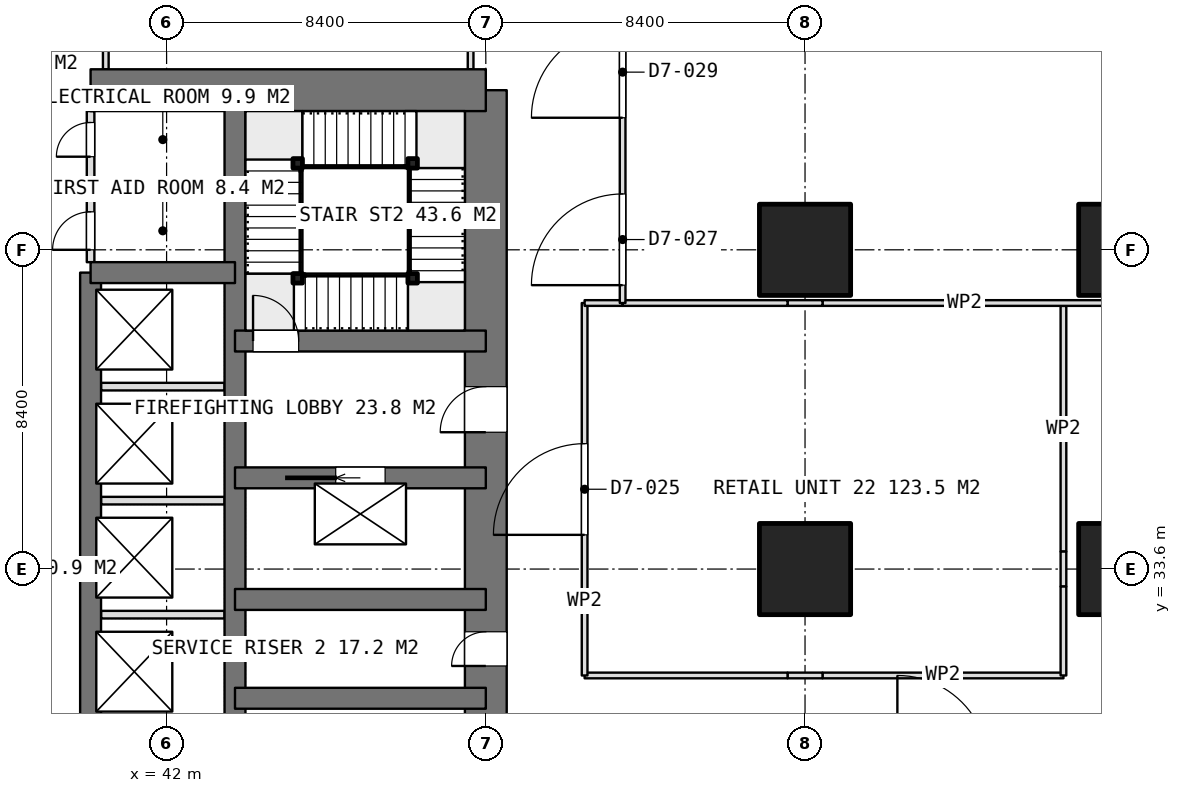
"""IFC4 building model, lengths in metres.
Left out: names, types, materials, properties, quantities, classifications, styles, units other than length and angle.
Written with IfcOpenShell. Run it as: python <this file> out.ifc"""

import sys

from ifc_helpers import new_model, si_unit, direction, frame, frame_2d, origin, origin_2d, place, context, subcontext, project, spatial, rectangle, extrude, element, fill, save


model = new_model("IFC4")
c1 = context("Model", 3, precision=1e-05, world=origin(), true_north=direction((0.0, 1.0)))
c2 = subcontext(c1, "Body", "Model", "MODEL_VIEW")
j1 = project(units=[si_unit("LENGTHUNIT", "METRE"), si_unit("PLANEANGLEUNIT", "RADIAN")], contexts=[c1])
p1 = place(None, origin())
s1 = spatial("IfcSite", under=j1, at=p1, CompositionType="ELEMENT")
p2 = place(p1, origin())
s2 = spatial("IfcBuilding", under=s1, at=p2, CompositionType="ELEMENT")
p3 = place(p2, frame((0.0, 0.0, 10.4)))
s3 = spatial("IfcBuildingStorey", under=s2, at=p3, CompositionType="ELEMENT", Elevation=10.4)
p4 = place(p3, frame((40.0, 46.2, 0.0), z_axis=(0.0, 0.0, 1.0), x_axis=(1.0, 0.0, 0.0)))
e1 = element("IfcWall", 1, at=p4, inside=s3, PredefinedType="SHEAR", context=c2, shape_type="SweptSolid", body=[
    extrude(rectangle(XDim=10.4, YDim=1.1, at=frame_2d((5.2, 0.0))), origin(), (0.0, 0.0, 1.0), 5.0),
])
p5 = place(p3, frame((50.4, 21.0, 0.0), z_axis=(0.0, 0.0, 1.0), x_axis=(0.0, 1.0, 0.0)))
e2 = element("IfcWall", 2, at=p5, inside=s3, PredefinedType="SHEAR", context=c2, shape_type="SweptSolid", body=[
    extrude(rectangle(XDim=25.2, YDim=1.1, at=frame_2d((12.6, 0.0))), origin(), (0.0, 0.0, 1.0), 5.0),
])
p6 = place(p5, frame((16.2, 0.0, 0.0)))
e3 = element("IfcOpeningElement", 3, at=p6, cuts=e2, PredefinedType="OPENING", context=c2, shape_type="SweptSolid", body=[
    extrude(rectangle(XDim=1.2, YDim=2.1, at=frame_2d((0.6, 1.05))), frame((0.0, 0.56, 0.0), z_axis=(0.0, -1.0, 0.0), x_axis=(1.0, 0.0, 0.0)), (0.0, 0.0, 1.0), 1.12),
])
p7 = place(p5, frame((10.05, 0.0, 0.0)))
e4 = element("IfcOpeningElement", 4, at=p7, cuts=e2, PredefinedType="OPENING", context=c2, shape_type="SweptSolid", body=[
    extrude(rectangle(XDim=0.9, YDim=2.1, at=frame_2d((0.45, 1.05))), frame((0.0, 0.56, 0.0), z_axis=(0.0, -1.0, 0.0), x_axis=(1.0, 0.0, 0.0)), (0.0, 0.0, 1.0), 1.12),
])
p8 = place(p5, frame((7.45, 0.0, 0.0)))
e5 = element("IfcOpeningElement", 5, at=p8, cuts=e2, PredefinedType="OPENING", context=c2, shape_type="SweptSolid", body=[
    extrude(rectangle(XDim=0.9, YDim=2.1, at=frame_2d((0.45, 1.05))), frame((0.0, 0.56, 0.0), z_axis=(0.0, -1.0, 0.0), x_axis=(1.0, 0.0, 0.0)), (0.0, 0.0, 1.0), 1.12),
])
p9 = place(p5, frame((0.75, 0.0, 0.0)))
e6 = element("IfcOpeningElement", 6, at=p9, cuts=e2, PredefinedType="OPENING", context=c2, shape_type="SweptSolid", body=[
    extrude(rectangle(XDim=1.2, YDim=2.1, at=frame_2d((0.6, 1.05))), frame((0.0, 0.56, 0.0), z_axis=(0.0, -1.0, 0.0), x_axis=(1.0, 0.0, 0.0)), (0.0, 0.0, 1.0), 1.12),
])
p10 = place(p3, frame((43.8, 21.0, 0.0), z_axis=(0.0, 0.0, 1.0), x_axis=(0.0, 1.0, 0.0)))
e7 = element("IfcWall", 7, at=p10, inside=s3, PredefinedType="SHEAR", context=c2, shape_type="SweptSolid", body=[
    extrude(rectangle(XDim=25.2, YDim=0.55, at=frame_2d((12.6, 0.0))), origin(), (0.0, 0.0, 1.0), 5.0),
])
p11 = place(p3, frame((40.0, 23.4, 0.0), z_axis=(0.0, 0.0, 1.0), x_axis=(0.0, 1.0, 0.0)))
e8 = element("IfcWall", 8, at=p11, inside=s3, PredefinedType="SHEAR", context=c2, shape_type="SweptSolid", body=[
    extrude(rectangle(XDim=18.0, YDim=0.55, at=frame_2d((9.0, 0.0))), origin(), (0.0, 0.0, 1.0), 5.0),
])
p12 = place(p3, frame((40.0, 41.4, 0.0), z_axis=(0.0, 0.0, 1.0), x_axis=(1.0, 0.0, 0.0)))
e9 = element("IfcWall", 9, at=p12, inside=s3, PredefinedType="SHEAR", context=c2, shape_type="SweptSolid", body=[
    extrude(rectangle(XDim=3.8, YDim=0.55, at=frame_2d((1.9, 0.0))), origin(), (0.0, 0.0, 1.0), 5.0),
])
for number, where, z_axis, x_axis in (
    (10, (43.8, 30.2, 0.0), (0.0, 0.0, 1.0), (1.0, 0.0, 0.0)),
    (11, (43.8, 32.8, 0.0), (0.0, 0.0, 1.0), (1.0, 0.0, 0.0)),
):
    element("IfcWall", number, at=place(p3, frame(where, z_axis=z_axis, x_axis=x_axis)), inside=s3, PredefinedType="SHEAR", context=c2, shape_type="SweptSolid", body=[
        extrude(rectangle(XDim=6.6, YDim=0.55, at=frame_2d((3.3, 0.0))), origin(), (0.0, 0.0, 1.0), 5.0),
    ])
p13 = place(p3, frame((43.8, 36.0, 0.0), z_axis=(0.0, 0.0, 1.0), x_axis=(1.0, 0.0, 0.0)))
e12 = element("IfcWall", 12, at=p13, inside=s3, PredefinedType="SHEAR", context=c2, shape_type="SweptSolid", body=[
    extrude(rectangle(XDim=6.6, YDim=0.55, at=frame_2d((3.3, 0.0))), origin(), (0.0, 0.0, 1.0), 5.0),
])
p14 = place(p13, frame((2.65, 0.0, 0.0)))
e13 = element("IfcOpeningElement", 13, at=p14, cuts=e12, PredefinedType="OPENING", context=c2, shape_type="SweptSolid", body=[
    extrude(rectangle(XDim=1.3, YDim=2.1, at=frame_2d((0.65, 1.05))), frame((0.0, 0.285, 0.0), z_axis=(0.0, -1.0, 0.0), x_axis=(1.0, 0.0, 0.0)), (0.0, 0.0, 1.0), 0.57),
])
p15 = place(p3, frame((43.8, 39.6, 0.0), z_axis=(0.0, 0.0, 1.0), x_axis=(1.0, 0.0, 0.0)))
e14 = element("IfcWall", 14, at=p15, inside=s3, PredefinedType="SHEAR", context=c2, shape_type="SweptSolid", body=[
    extrude(rectangle(XDim=6.6, YDim=0.55, at=frame_2d((3.3, 0.0))), origin(), (0.0, 0.0, 1.0), 5.0),
])
p16 = place(p15, frame((0.475, 0.0, 0.0)))
e15 = element("IfcOpeningElement", 15, at=p16, cuts=e14, PredefinedType="OPENING", context=c2, shape_type="SweptSolid", body=[
    extrude(rectangle(XDim=1.2, YDim=2.1, at=frame_2d((0.6, 1.05))), frame((0.0, 0.285, 0.0), z_axis=(0.0, -1.0, 0.0), x_axis=(1.0, 0.0, 0.0)), (0.0, 0.0, 1.0), 0.57),
])
for number, where, z_axis, x_axis in (
    (16, (58.8, 33.6, 0.0), (0.0, 0.0, 1.0), (1.0, 0.0, 0.0)),
    (17, (58.8, 42.0, 0.0), (0.0, 0.0, 1.0), (1.0, 0.0, 0.0)),
    (18, (67.2, 33.6, 0.0), (0.0, 0.0, 1.0), (1.0, 0.0, 0.0)),
    (19, (67.2, 42.0, 0.0), (0.0, 0.0, 1.0), (1.0, 0.0, 0.0)),
):
    element("IfcColumn", number, at=place(p3, frame(where, z_axis=z_axis, x_axis=x_axis)), inside=s3, PredefinedType="COLUMN", context=c2, shape_type="SweptSolid", body=[
        extrude(rectangle(XDim=2.4, YDim=2.4, at=origin_2d()), origin(), (0.0, 0.0, 1.0), 5.0),
    ])
for number, where, z_axis, x_axis in (
    (20, (40.275, 32.4, 0.0), (0.0, 0.0, 1.0), (1.0, 0.0, 0.0)),
    (21, (40.275, 35.4, 0.0), (0.0, 0.0, 1.0), (1.0, 0.0, 0.0)),
    (22, (40.275, 38.4, 0.0), (0.0, 0.0, 1.0), (1.0, 0.0, 0.0)),
):
    element("IfcWall", number, at=place(p3, frame(where, z_axis=z_axis, x_axis=x_axis)), inside=s3, PredefinedType="PARTITIONING", context=c2, shape_type="SweptSolid", body=[
        extrude(rectangle(XDim=3.25, YDim=0.2, at=frame_2d((1.625, 0.0))), origin(), (0.0, 0.0, 1.0), 4.7),
    ])
p17 = place(p3, frame((40.0, 41.675, 0.0), z_axis=(0.0, 0.0, 1.0), x_axis=(0.0, 1.0, 0.0)))
e23 = element("IfcWall", 23, at=p17, inside=s3, PredefinedType="PARTITIONING", context=c2, shape_type="SweptSolid", body=[
    extrude(rectangle(XDim=3.975, YDim=0.2, at=frame_2d((1.987, 0.0))), origin(), (0.0, 0.0, 1.0), 4.7),
])
p18 = place(p17, frame((2.775, 0.0, 0.0)))
e24 = element("IfcOpeningElement", 24, at=p18, cuts=e23, PredefinedType="OPENING", context=c2, shape_type="SweptSolid", body=[
    extrude(rectangle(XDim=0.9, YDim=2.1, at=frame_2d((0.45, 1.05))), frame((0.0, 0.11, 0.0), z_axis=(0.0, -1.0, 0.0), x_axis=(1.0, 0.0, 0.0)), (0.0, 0.0, 1.0), 0.22),
])
p19 = place(p17, frame((0.325, 0.0, 0.0)))
e25 = element("IfcOpeningElement", 25, at=p19, cuts=e23, PredefinedType="OPENING", context=c2, shape_type="SweptSolid", body=[
    extrude(rectangle(XDim=1.0, YDim=2.1, at=frame_2d((0.5, 1.05))), frame((0.0, 0.11, 0.0), z_axis=(0.0, -1.0, 0.0), x_axis=(1.0, 0.0, 0.0)), (0.0, 0.0, 1.0), 0.22),
])
p20 = place(p3, frame((40.0, 43.6, 0.0), z_axis=(0.0, 0.0, 1.0), x_axis=(1.0, 0.0, 0.0)))
e26 = element("IfcWall", 26, at=p20, inside=s3, PredefinedType="PARTITIONING", context=c2, shape_type="SweptSolid", body=[
    extrude(rectangle(XDim=3.525, YDim=0.2, at=frame_2d((1.762, 0.0))), origin(), (0.0, 0.0, 1.0), 4.7),
])
for number, where, z_axis, x_axis in (
    (27, (40.4, 46.75, 0.0), (0.0, 0.0, 1.0), (0.0, 1.0, 0.0)),
    (28, (50.0, 46.75, 0.0), (0.0, 0.0, 1.0), (0.0, 1.0, 0.0)),
):
    element("IfcWall", number, at=place(p3, frame(where, z_axis=z_axis, x_axis=x_axis)), inside=s3, PredefinedType="PARTITIONING", context=c2, shape_type="SweptSolid", body=[
        extrude(rectangle(XDim=2.575, YDim=0.15, at=frame_2d((1.288, 0.0))), origin(), (0.0, 0.0, 1.0), 4.7),
    ])
p21 = place(p3, frame((66.74, 40.6, 0.0), z_axis=(0.0, 0.0, 1.0), x_axis=(-1.0, 0.0, 0.0)))
e29 = element("IfcWall", 29, at=p21, inside=s3, PredefinedType="PARTITIONING", context=c2, shape_type="SweptSolid", body=[
    extrude(rectangle(XDim=7.48, YDim=0.15, at=frame_2d((3.74, 0.0))), origin(), (0.0, 0.0, 1.0), 4.7),
])
p22 = place(p3, frame((59.26, 40.6, 0.0), z_axis=(0.0, 0.0, 1.0), x_axis=(-1.0, 0.0, 0.0)))
e30 = element("IfcWall", 30, at=p22, inside=s3, PredefinedType="PARTITIONING", context=c2, shape_type="SweptSolid", body=[
    extrude(rectangle(XDim=0.92, YDim=0.15, at=frame_2d((0.46, 0.0))), origin(), (0.0, 0.0, 1.0), 2.9),
])
p23 = place(p3, frame((58.34, 40.6, 0.0), z_axis=(0.0, 0.0, 1.0), x_axis=(-1.0, 0.0, 0.0)))
e31 = element("IfcWall", 31, at=p23, inside=s3, PredefinedType="PARTITIONING", context=c2, shape_type="SweptSolid", body=[
    extrude(rectangle(XDim=4.34, YDim=0.15, at=frame_2d((2.17, 0.0))), origin(), (0.0, 0.0, 1.0), 4.7),
])
p24 = place(p3, frame((54.0, 40.6, 0.0), z_axis=(0.0, 0.0, 1.0), x_axis=(0.0, 1.0, 0.0)))
e32 = element("IfcWall", 32, at=p24, inside=s3, PredefinedType="PARTITIONING", context=c2, shape_type="SweptSolid", body=[
    extrude(rectangle(XDim=9.34, YDim=0.15, at=frame_2d((4.67, 0.0))), origin(), (0.0, 0.0, 1.0), 4.7),
])
p25 = place(p24, frame((4.875, 0.0, 0.0)))
e33 = element("IfcOpeningElement", 33, at=p25, cuts=e32, PredefinedType="OPENING", context=c2, shape_type="SweptSolid", body=[
    extrude(rectangle(XDim=2.4, YDim=2.4, at=frame_2d((1.2, 1.2))), frame((0.0, 0.085, 0.0), z_axis=(0.0, -1.0, 0.0), x_axis=(1.0, 0.0, 0.0)), (0.0, 0.0, 1.0), 0.17),
])
p26 = place(p24, frame((0.47, 0.0, 0.0)))
e34 = element("IfcOpeningElement", 34, at=p26, cuts=e32, PredefinedType="OPENING", context=c2, shape_type="SweptSolid", body=[
    extrude(rectangle(XDim=2.4, YDim=2.4, at=frame_2d((1.2, 1.2))), frame((0.0, 0.085, 0.0), z_axis=(0.0, -1.0, 0.0), x_axis=(1.0, 0.0, 0.0)), (0.0, 0.0, 1.0), 0.17),
])
p27 = place(p3, frame((65.6, 30.8, 0.0), z_axis=(0.0, 0.0, 1.0), x_axis=(-1.0, 0.0, 0.0)))
e35 = element("IfcWall", 35, at=p27, inside=s3, PredefinedType="PARTITIONING", context=c2, shape_type="SweptSolid", body=[
    extrude(rectangle(XDim=6.34, YDim=0.15, at=frame_2d((3.17, 0.0))), origin(), (0.0, 0.0, 1.0), 4.7),
])
p28 = place(p3, frame((59.26, 30.8, 0.0), z_axis=(0.0, 0.0, 1.0), x_axis=(-1.0, 0.0, 0.0)))
e36 = element("IfcWall", 36, at=p28, inside=s3, PredefinedType="PARTITIONING", context=c2, shape_type="SweptSolid", body=[
    extrude(rectangle(XDim=0.92, YDim=0.15, at=frame_2d((0.46, 0.0))), origin(), (0.0, 0.0, 1.0), 2.9),
])
p29 = place(p3, frame((58.34, 30.8, 0.0), z_axis=(0.0, 0.0, 1.0), x_axis=(-1.0, 0.0, 0.0)))
e37 = element("IfcWall", 37, at=p29, inside=s3, PredefinedType="PARTITIONING", context=c2, shape_type="SweptSolid", body=[
    extrude(rectangle(XDim=5.34, YDim=0.15, at=frame_2d((2.67, 0.0))), origin(), (0.0, 0.0, 1.0), 4.7),
])
p30 = place(p3, frame((53.0, 30.8, 0.0), z_axis=(0.0, 0.0, 1.0), x_axis=(0.0, 1.0, 0.0)))
e38 = element("IfcWall", 38, at=p30, inside=s3, PredefinedType="PARTITIONING", context=c2, shape_type="SweptSolid", body=[
    extrude(rectangle(XDim=9.8, YDim=0.15, at=frame_2d((4.9, 0.0))), origin(), (0.0, 0.0, 1.0), 4.7),
])
p31 = place(p30, frame((3.7, 0.0, 0.0)))
e39 = element("IfcOpeningElement", 39, at=p31, cuts=e38, PredefinedType="OPENING", context=c2, shape_type="SweptSolid", body=[
    extrude(rectangle(XDim=2.4, YDim=2.4, at=frame_2d((1.2, 1.2))), frame((0.0, 0.085, 0.0), z_axis=(0.0, -1.0, 0.0), x_axis=(1.0, 0.0, 0.0)), (0.0, 0.0, 1.0), 0.17),
])
p32 = place(p3, frame((53.0, 40.6, 0.0), z_axis=(0.0, 0.0, 1.0), x_axis=(1.0, 0.0, 0.0)))
e40 = element("IfcWall", 40, at=p32, inside=s3, PredefinedType="PARTITIONING", context=c2, shape_type="SweptSolid", body=[
    extrude(rectangle(XDim=1.0, YDim=0.15, at=frame_2d((0.5, 0.0))), origin(), (0.0, 0.0, 1.0), 4.7),
])
p33 = place(p3, frame((65.6, 40.525, 0.0), z_axis=(0.0, 0.0, 1.0), x_axis=(0.0, -1.0, 0.0)))
e41 = element("IfcWall", 41, at=p33, inside=s3, PredefinedType="PARTITIONING", context=c2, shape_type="SweptSolid", body=[
    extrude(rectangle(XDim=6.465, YDim=0.15, at=frame_2d((3.232, 0.0))), origin(), (0.0, 0.0, 1.0), 4.7),
])
p34 = place(p3, frame((65.6, 34.06, 0.0), z_axis=(0.0, 0.0, 1.0), x_axis=(0.0, -1.0, 0.0)))
e42 = element("IfcWall", 42, at=p34, inside=s3, PredefinedType="PARTITIONING", context=c2, shape_type="SweptSolid", body=[
    extrude(rectangle(XDim=0.92, YDim=0.15, at=frame_2d((0.46, 0.0))), origin(), (0.0, 0.0, 1.0), 2.9),
])
p35 = place(p3, frame((65.6, 33.14, 0.0), z_axis=(0.0, 0.0, 1.0), x_axis=(0.0, -1.0, 0.0)))
e43 = element("IfcWall", 43, at=p35, inside=s3, PredefinedType="PARTITIONING", context=c2, shape_type="SweptSolid", body=[
    extrude(rectangle(XDim=2.34, YDim=0.15, at=frame_2d((1.17, 0.0))), origin(), (0.0, 0.0, 1.0), 4.7),
])
for number, where, z_axis, x_axis in (
    (44, (45.45, 41.25, 0.0), (0.0, 0.0, 1.0), (1.0, 0.0, 0.0)),
    (45, (45.45, 44.275, 0.0), (0.0, 0.0, 1.0), (1.0, 0.0, 0.0)),
    (46, (48.475, 44.275, 0.0), (0.0, 0.0, 1.0), (1.0, 0.0, 0.0)),
    (47, (48.475, 41.25, 0.0), (0.0, 0.0, 1.0), (1.0, 0.0, 0.0)),
):
    element("IfcColumn", number, at=place(p3, frame(where, z_axis=z_axis, x_axis=x_axis)), inside=s3, PredefinedType="COLUMN", context=c2, shape_type="SweptSolid", body=[
        extrude(rectangle(XDim=0.25, YDim=0.25, at=origin_2d()), origin(), (0.0, 0.0, 1.0), 5.0),
    ])
p36 = place(p6, origin())
e48 = element("IfcDoor", 48, at=p36, inside=s3, OperationType="SINGLE_SWING_LEFT", PredefinedType="DOOR", context=c2, shape_type="SweptSolid", body=[
    extrude(rectangle(XDim=1.2, YDim=2.1, at=frame_2d((0.6, 1.05))), frame((0.0, 0.025, 0.0), z_axis=(0.0, -1.0, 0.0), x_axis=(1.0, 0.0, 0.0)), (0.0, 0.0, 1.0), 0.05),
])
fill(e3, e48)
p37 = place(p7, origin())
e49 = element("IfcDoor", 49, at=p37, inside=s3, OperationType="SINGLE_SWING_LEFT", PredefinedType="DOOR", context=c2, shape_type="SweptSolid", body=[
    extrude(rectangle(XDim=0.9, YDim=2.1, at=frame_2d((0.45, 1.05))), frame((0.0, 0.025, 0.0), z_axis=(0.0, -1.0, 0.0), x_axis=(1.0, 0.0, 0.0)), (0.0, 0.0, 1.0), 0.05),
])
fill(e4, e49)
p38 = place(p18, origin())
e50 = element("IfcDoor", 50, at=p38, inside=s3, OperationType="SINGLE_SWING_LEFT", PredefinedType="DOOR", context=c2, shape_type="SweptSolid", body=[
    extrude(rectangle(XDim=0.9, YDim=2.1, at=frame_2d((0.45, 1.05))), frame((0.0, 0.025, 0.0), z_axis=(0.0, -1.0, 0.0), x_axis=(1.0, 0.0, 0.0)), (0.0, 0.0, 1.0), 0.05),
])
fill(e24, e50)
p39 = place(p19, origin())
e51 = element("IfcDoor", 51, at=p39, inside=s3, OperationType="SINGLE_SWING_LEFT", PredefinedType="DOOR", context=c2, shape_type="SweptSolid", body=[
    extrude(rectangle(XDim=1.0, YDim=2.1, at=frame_2d((0.5, 1.05))), frame((0.0, 0.025, 0.0), z_axis=(0.0, -1.0, 0.0), x_axis=(1.0, 0.0, 0.0)), (0.0, 0.0, 1.0), 0.05),
])
fill(e25, e51)
p40 = place(p14, origin())
e52 = element("IfcDoor", 52, at=p40, inside=s3, OperationType="SLIDING_TO_LEFT", PredefinedType="USERDEFINED", context=c2, shape_type="SweptSolid", body=[
    extrude(rectangle(XDim=1.3, YDim=2.1, at=frame_2d((0.65, 1.05))), frame((0.0, 0.025, 0.0), z_axis=(0.0, -1.0, 0.0), x_axis=(1.0, 0.0, 0.0)), (0.0, 0.0, 1.0), 0.05),
])
fill(e13, e52)
p41 = place(p25, origin())
e53 = element("IfcDoor", 53, at=p41, inside=s3, OperationType="DOUBLE_DOOR_SINGLE_SWING", PredefinedType="DOOR", context=c2, shape_type="SweptSolid", body=[
    extrude(rectangle(XDim=2.4, YDim=2.4, at=frame_2d((1.2, 1.2))), frame((0.0, 0.025, 0.0), z_axis=(0.0, -1.0, 0.0), x_axis=(1.0, 0.0, 0.0)), (0.0, 0.0, 1.0), 0.05),
])
fill(e33, e53)
p42 = place(p26, origin())
e54 = element("IfcDoor", 54, at=p42, inside=s3, OperationType="DOUBLE_DOOR_SINGLE_SWING", PredefinedType="DOOR", context=c2, shape_type="SweptSolid", body=[
    extrude(rectangle(XDim=2.4, YDim=2.4, at=frame_2d((1.2, 1.2))), frame((0.0, 0.025, 0.0), z_axis=(0.0, -1.0, 0.0), x_axis=(1.0, 0.0, 0.0)), (0.0, 0.0, 1.0), 0.05),
])
fill(e34, e54)
p43 = place(p31, origin())
e55 = element("IfcDoor", 55, at=p43, inside=s3, OperationType="DOUBLE_DOOR_SINGLE_SWING", PredefinedType="DOOR", context=c2, shape_type="SweptSolid", body=[
    extrude(rectangle(XDim=2.4, YDim=2.4, at=frame_2d((1.2, 1.2))), frame((0.0, 0.025, 0.0), z_axis=(0.0, -1.0, 0.0), x_axis=(1.0, 0.0, 0.0)), (0.0, 0.0, 1.0), 0.05),
])
fill(e39, e55)
p44 = place(p16, origin())
e56 = element("IfcDoor", 56, at=p44, inside=s3, OperationType="SINGLE_SWING_RIGHT", PredefinedType="DOOR", context=c2, shape_type="SweptSolid", body=[
    extrude(rectangle(XDim=1.2, YDim=2.1, at=frame_2d((0.6, 1.05))), frame((0.0, 0.025, 0.0), z_axis=(0.0, -1.0, 0.0), x_axis=(1.0, 0.0, 0.0)), (0.0, 0.0, 1.0), 0.05),
])
fill(e15, e56)
save(model, sys.argv[1])
